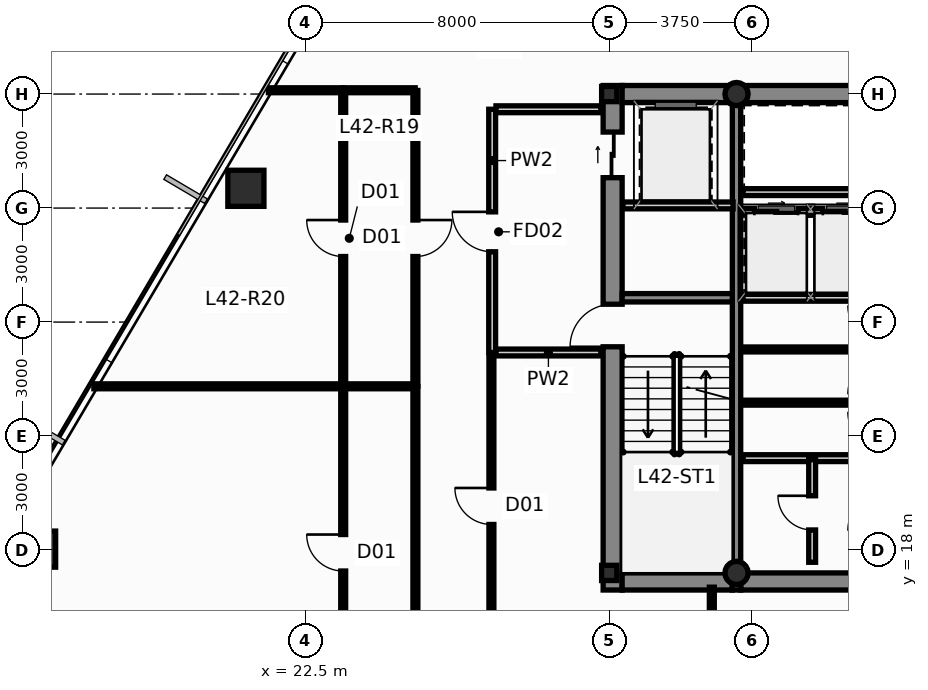
"""IFC4 building model, lengths in metres.
Left out: names, types, materials, properties, quantities, classifications, styles, units other than length and angle.
Written with IfcOpenShell. Run it as: python <this file> out.ifc"""

import sys

from ifc_helpers import new_model, si_unit, direction, frame, frame_2d, origin, origin_2d, place, context, subcontext, project, spatial, rectangle, hollow_rectangle, hollow_circle, i_section, extrude, source, transform, mapped, element, fill, save


model = new_model("IFC4")
c1 = context("Model", 3, precision=1e-05, world=origin(), true_north=direction((0.0, 1.0)))
c2 = subcontext(c1, "Body", "Model", "MODEL_VIEW")
j1 = project(units=[si_unit("LENGTHUNIT", "METRE"), si_unit("PLANEANGLEUNIT", "RADIAN")], contexts=[c1])
p1 = place(None, origin())
s1 = spatial("IfcSite", under=j1, at=p1, CompositionType="ELEMENT")
p2 = place(p1, origin())
s2 = spatial("IfcBuilding", under=s1, at=p2, CompositionType="ELEMENT")
p3 = place(p2, frame((0.0, 0.0, 162.15)))
s3 = spatial("IfcBuildingStorey", under=s2, at=p3, CompositionType="ELEMENT", Elevation=162.15)
m1 = source(origin(), c2, "Body", "SweptSolid", [
    extrude(i_section(OverallWidth=0.4, OverallDepth=0.4, WebThickness=0.02, FlangeThickness=0.032, at=origin_2d()), origin(), (0.0, 0.0, 1.0), 3.65),
])
for number, where, z_axis, x_axis in (
    (1, (30.5, 17.4, 0.0), (0.0, 0.0, 1.0), (1.0, 0.0, 0.0)),
    (2, (30.5, 30.0, 0.0), (0.0, 0.0, 1.0), (1.0, 0.0, 0.0)),
):
    element("IfcColumn", number, at=place(p3, frame(where, z_axis=z_axis, x_axis=x_axis)), inside=s3, PredefinedType="COLUMN", context=c2, shape_type="MappedRepresentation", body=[
        mapped(m1, transform((0.0, 0.0, 0.0), scale=1.0)),
    ])
m2 = source(origin(), c2, "Body", "SweptSolid", [
    extrude(hollow_circle(Radius=0.305, WallThickness=0.025, at=origin_2d()), origin(), (0.0, 0.0, 1.0), 3.65),
])
for number, where, z_axis, x_axis in (
    (3, (33.85, 17.4, 0.0), (0.0, 0.0, 1.0), (1.0, 0.0, 0.0)),
    (4, (33.85, 30.0, 0.0), (0.0, 0.0, 1.0), (1.0, 0.0, 0.0)),
):
    element("IfcColumn", number, at=place(p3, frame(where, z_axis=z_axis, x_axis=x_axis)), inside=s3, PredefinedType="COLUMN", context=c2, shape_type="MappedRepresentation", body=[
        mapped(m2, transform((0.0, 0.0, 0.0), scale=1.0)),
    ])
p4 = place(p3, frame((30.59, 16.95, 0.0), z_axis=(0.0, 0.0, 1.0), x_axis=(0.0, 1.0, 0.0)))
e5 = element("IfcWall", 5, at=p4, inside=s3, PredefinedType="SHEAR", context=c2, shape_type="SweptSolid", body=[
    extrude(rectangle(XDim=13.275, YDim=0.5, at=frame_2d((6.638, 0.0))), origin(), (0.0, 0.0, 1.0), 3.65),
])
p5 = place(p4, frame((6.4, 0.0, 0.0)))
e6 = element("IfcOpeningElement", 6, at=p5, cuts=e5, PredefinedType="OPENING", context=c2, shape_type="SweptSolid", body=[
    extrude(rectangle(XDim=1.12, YDim=2.15, at=frame_2d((0.56, 1.075))), frame((0.0, 0.262, 0.0), z_axis=(0.0, -1.0, 0.0), x_axis=(1.0, 0.0, 0.0)), (0.0, 0.0, 1.0), 0.524),
])
p6 = place(p4, frame((10.85, 0.0, 0.0)))
e7 = element("IfcOpeningElement", 7, at=p6, cuts=e5, PredefinedType="OPENING", context=c2, shape_type="SweptSolid", body=[
    extrude(rectangle(XDim=1.2, YDim=2.2, at=frame_2d((0.6, 1.1))), frame((0.0, 0.262, 0.0), z_axis=(0.0, -1.0, 0.0), x_axis=(1.0, 0.0, 0.0)), (0.0, 0.0, 1.0), 0.524),
])
p7 = place(p3, frame((30.84, 17.175, 0.0), z_axis=(0.0, 0.0, 1.0), x_axis=(1.0, 0.0, 0.0)))
e8 = element("IfcWall", 8, at=p7, inside=s3, PredefinedType="SHEAR", context=c2, shape_type="SweptSolid", body=[
    extrude(rectangle(XDim=2.9, YDim=0.45, at=frame_2d((1.45, 0.0))), origin(), (0.0, 0.0, 1.0), 3.65),
])
p8 = place(p3, frame((33.96, 17.175, 0.0), z_axis=(0.0, 0.0, 1.0), x_axis=(1.0, 0.0, 0.0)))
e9 = element("IfcWall", 9, at=p8, inside=s3, PredefinedType="SHEAR", context=c2, shape_type="SweptSolid", body=[
    extrude(rectangle(XDim=8.08, YDim=0.45, at=frame_2d((4.04, 0.0))), origin(), (0.0, 0.0, 1.0), 3.65),
])
p9 = place(p3, frame((30.84, 30.0, 0.0), z_axis=(0.0, 0.0, 1.0), x_axis=(1.0, 0.0, 0.0)))
e10 = element("IfcWall", 10, at=p9, inside=s3, PredefinedType="SHEAR", context=c2, shape_type="SweptSolid", body=[
    extrude(rectangle(XDim=2.9, YDim=0.45, at=frame_2d((1.45, 0.0))), origin(), (0.0, 0.0, 1.0), 3.65),
])
p10 = place(p3, frame((33.96, 30.0, 0.0), z_axis=(0.0, 0.0, 1.0), x_axis=(1.0, 0.0, 0.0)))
e11 = element("IfcWall", 11, at=p10, inside=s3, PredefinedType="SHEAR", context=c2, shape_type="SweptSolid", body=[
    extrude(rectangle(XDim=3.78, YDim=0.45, at=frame_2d((1.89, 0.0))), origin(), (0.0, 0.0, 1.0), 3.65),
])
p11 = place(p3, frame((33.85, 16.95, 0.0), z_axis=(0.0, 0.0, 1.0), x_axis=(0.0, 1.0, 0.0)))
e12 = element("IfcWall", 12, at=p11, inside=s3, PredefinedType="SHEAR", context=c2, shape_type="SweptSolid", body=[
    extrude(rectangle(XDim=13.275, YDim=0.22, at=frame_2d((6.638, 0.0))), origin(), (0.0, 0.0, 1.0), 3.65),
])
p12 = place(p3, frame((30.84, 24.64, 0.0), z_axis=(0.0, 0.0, 1.0), x_axis=(1.0, 0.0, 0.0)))
e13 = element("IfcWall", 13, at=p12, inside=s3, PredefinedType="SHEAR", context=c2, shape_type="SweptSolid", body=[
    extrude(rectangle(XDim=2.9, YDim=0.22, at=frame_2d((1.45, 0.0))), origin(), (0.0, 0.0, 1.0), 3.65),
])
m3 = source(origin(), c2, "Body", "SweptSolid", [
    extrude(hollow_rectangle(XDim=0.95, YDim=0.95, WallThickness=0.05, at=origin_2d()), origin(), (0.0, 0.0, 1.0), 3.651),
])
p13 = place(p3, frame((20.94, 27.52, 0.0), z_axis=(0.014845459728, -0.013775516685, 0.9997949027), x_axis=(0.68019775991, 0.733028653883, 0.0)))
e14 = element("IfcColumn", 14, at=p13, inside=s3, PredefinedType="COLUMN", context=c2, shape_type="MappedRepresentation", body=[
    mapped(m3, transform((0.0, 0.0, 0.0), scale=1.0)),
])
m4 = source(origin(), c2, "Body", "SweptSolid", [
    extrude(hollow_rectangle(XDim=0.95, YDim=0.95, WallThickness=0.05, at=origin_2d()), origin(), (0.0, 0.0, 1.0), 3.651),
])
p14 = place(p3, frame((15.458, 18.026, 0.0), z_axis=(0.010431098089, -0.021530856313, 0.999713766245), x_axis=(0.899947055326, 0.435999194506, 0.0)))
e15 = element("IfcColumn", 15, at=p14, inside=s3, PredefinedType="COLUMN", context=c2, shape_type="MappedRepresentation", body=[
    mapped(m4, transform((0.0, 0.0, 0.0), scale=1.0)),
])
p15 = place(p3, frame((34.02, 26.9, 0.0), z_axis=(0.0, 0.0, 1.0), x_axis=(1.0, 0.0, 0.0)))
e16 = element("IfcWall", 16, at=p15, inside=s3, PredefinedType="PARTITIONING", context=c2, shape_type="SweptSolid", body=[
    extrude(rectangle(XDim=3.6, YDim=0.18, at=frame_2d((1.8, 0.0))), origin(), (0.0, 0.0, 1.0), 3.4),
])
p16 = place(p15, frame((0.3, 0.0, 0.0)))
e17 = element("IfcOpeningElement", 17, at=p16, cuts=e16, PredefinedType="OPENING", context=c2, shape_type="SweptSolid", body=[
    extrude(rectangle(XDim=1.15, YDim=2.2, at=frame_2d((0.575, 1.1))), frame((0.0, 0.102, 0.0), z_axis=(0.0, -1.0, 0.0), x_axis=(1.0, 0.0, 0.0)), (0.0, 0.0, 1.0), 0.204),
])
p17 = place(p15, frame((2.1, 0.0, 0.0)))
e18 = element("IfcOpeningElement", 18, at=p17, cuts=e16, PredefinedType="OPENING", context=c2, shape_type="SweptSolid", body=[
    extrude(rectangle(XDim=1.15, YDim=2.2, at=frame_2d((0.575, 1.1))), frame((0.0, 0.102, 0.0), z_axis=(0.0, -1.0, 0.0), x_axis=(1.0, 0.0, 0.0)), (0.0, 0.0, 1.0), 0.204),
])
p18 = place(p3, frame((34.02, 24.64, 0.0), z_axis=(0.0, 0.0, 1.0), x_axis=(1.0, 0.0, 0.0)))
e19 = element("IfcWall", 19, at=p18, inside=s3, PredefinedType="PARTITIONING", context=c2, shape_type="SweptSolid", body=[
    extrude(rectangle(XDim=3.68, YDim=0.18, at=frame_2d((1.84, 0.0))), origin(), (0.0, 0.0, 1.0), 3.4),
])
p19 = place(p3, frame((34.02, 27.42, 0.0), z_axis=(0.0, 0.0, 1.0), x_axis=(1.0, 0.0, 0.0)))
e20 = element("IfcWall", 20, at=p19, inside=s3, PredefinedType="PARTITIONING", context=c2, shape_type="SweptSolid", body=[
    extrude(rectangle(XDim=3.66, YDim=0.18, at=frame_2d((1.83, 0.0))), origin(), (0.0, 0.0, 1.0), 3.4),
])
p20 = place(p3, frame((27.42, 23.2, 0.0), z_axis=(0.0, 0.0, 1.0), x_axis=(0.0, 1.0, 0.0)))
e21 = element("IfcWall", 21, at=p20, inside=s3, PredefinedType="PARTITIONING", context=c2, shape_type="SweptSolid", body=[
    extrude(rectangle(XDim=6.4, YDim=0.18, at=frame_2d((3.2, 0.0))), origin(), (0.0, 0.0, 1.0), 3.078),
])
p21 = place(p20, frame((2.65, 0.0, 0.0)))
e22 = element("IfcOpeningElement", 22, at=p21, cuts=e21, PredefinedType="OPENING", context=c2, shape_type="SweptSolid", body=[
    extrude(rectangle(XDim=1.05, YDim=2.15, at=frame_2d((0.525, 1.075))), frame((0.0, 0.102, 0.0), z_axis=(0.0, -1.0, 0.0), x_axis=(1.0, 0.0, 0.0)), (0.0, 0.0, 1.0), 0.204),
])
p22 = place(p3, frame((27.52, 23.2, 0.0), z_axis=(0.0, 0.0, 1.0), x_axis=(1.0, 0.0, 0.0)))
e23 = element("IfcWall", 23, at=p22, inside=s3, PredefinedType="PARTITIONING", context=c2, shape_type="SweptSolid", body=[
    extrude(rectangle(XDim=2.76, YDim=0.18, at=frame_2d((1.38, 0.0))), origin(), (0.0, 0.0, 1.0), 3.4),
])
p23 = place(p3, frame((27.52, 29.6, 0.0), z_axis=(0.0, 0.0, 1.0), x_axis=(1.0, 0.0, 0.0)))
e24 = element("IfcWall", 24, at=p23, inside=s3, PredefinedType="PARTITIONING", context=c2, shape_type="SweptSolid", body=[
    extrude(rectangle(XDim=2.76, YDim=0.18, at=frame_2d((1.38, 0.0))), origin(), (0.0, 0.0, 1.0), 2.925),
])
p24 = place(p3, frame((30.86, 27.07, 0.0), z_axis=(0.0, 0.0, 1.0), x_axis=(1.0, 0.0, 0.0)))
e25 = element("IfcWall", 25, at=p24, inside=s3, PredefinedType="PARTITIONING", context=c2, shape_type="SweptSolid", body=[
    extrude(rectangle(XDim=2.9, YDim=0.18, at=frame_2d((1.45, 0.0))), origin(), (0.0, 0.0, 1.0), 3.4),
])
p25 = place(p3, frame((34.02, 20.42, 0.0), z_axis=(0.0, 0.0, 1.0), x_axis=(1.0, 0.0, 0.0)))
e26 = element("IfcWall", 26, at=p25, inside=s3, PredefinedType="PARTITIONING", context=c2, shape_type="SweptSolid", body=[
    extrude(rectangle(XDim=3.64, YDim=0.18, at=frame_2d((1.82, 0.0))), origin(), (0.0, 0.0, 1.0), 3.4),
])
for number, where, z_axis, x_axis in (
    (27, (34.02, 21.88, 0.0), (0.0, 0.0, 1.0), (1.0, 0.0, 0.0)),
    (28, (34.02, 23.28, 0.0), (0.0, 0.0, 1.0), (1.0, 0.0, 0.0)),
):
    element("IfcWall", number, at=place(p3, frame(where, z_axis=z_axis, x_axis=x_axis)), inside=s3, PredefinedType="PARTITIONING", context=c2, shape_type="SweptSolid", body=[
        extrude(rectangle(XDim=3.58, YDim=0.13, at=frame_2d((1.79, 0.0))), origin(), (0.0, 0.0, 1.0), 3.4),
    ])
p26 = place(p3, frame((35.84, 17.68, 0.0), z_axis=(0.0, 0.0, 1.0), x_axis=(0.0, 1.0, 0.0)))
e29 = element("IfcWall", 29, at=p26, inside=s3, PredefinedType="PARTITIONING", context=c2, shape_type="SweptSolid", body=[
    extrude(rectangle(XDim=2.7, YDim=0.18, at=frame_2d((1.35, 0.0))), origin(), (0.0, 0.0, 1.0), 3.4),
])
p27 = place(p26, frame((0.85, 0.0, 0.0)))
e30 = element("IfcOpeningElement", 30, at=p27, cuts=e29, PredefinedType="OPENING", context=c2, shape_type="SweptSolid", body=[
    extrude(rectangle(XDim=0.9, YDim=2.1, at=frame_2d((0.45, 1.05))), frame((0.0, 0.102, 0.0), z_axis=(0.0, -1.0, 0.0), x_axis=(1.0, 0.0, 0.0)), (0.0, 0.0, 1.0), 0.204),
])
p28 = place(p3, frame((23.5, 13.555, 0.0), z_axis=(0.0, 0.0, 1.0), x_axis=(0.0, 1.0, 0.0)))
e31 = element("IfcWall", 31, at=p28, inside=s3, PredefinedType="PARTITIONING", context=c2, shape_type="SweptSolid", body=[
    extrude(rectangle(XDim=8.75, YDim=0.13, at=frame_2d((4.375, 0.0))), origin(), (0.0, 0.0, 1.0), 3.078),
])
p29 = place(p28, frame((3.895, 0.0, 0.0)))
e32 = element("IfcOpeningElement", 32, at=p29, cuts=e31, PredefinedType="OPENING", context=c2, shape_type="SweptSolid", body=[
    extrude(rectangle(XDim=0.96, YDim=2.15, at=frame_2d((0.48, 1.075))), frame((0.0, 0.077, 0.0), z_axis=(0.0, -1.0, 0.0), x_axis=(1.0, 0.0, 0.0)), (0.0, 0.0, 1.0), 0.154),
])
p30 = place(p3, frame((27.4, 15.205, 0.0), z_axis=(0.0, 0.0, 1.0), x_axis=(0.0, 1.0, 0.0)))
e33 = element("IfcWall", 33, at=p30, inside=s3, PredefinedType="PARTITIONING", context=c2, shape_type="SweptSolid", body=[
    extrude(rectangle(XDim=7.9, YDim=0.13, at=frame_2d((3.95, 0.0))), origin(), (0.0, 0.0, 1.0), 3.4),
])
p31 = place(p30, frame((3.47, 0.0, 0.0)))
e34 = element("IfcOpeningElement", 34, at=p31, cuts=e33, PredefinedType="OPENING", context=c2, shape_type="SweptSolid", body=[
    extrude(rectangle(XDim=0.96, YDim=2.15, at=frame_2d((0.48, 1.075))), frame((0.0, 0.077, 0.0), z_axis=(0.0, -1.0, 0.0), x_axis=(1.0, 0.0, 0.0)), (0.0, 0.0, 1.0), 0.154),
])
p32 = place(p3, frame((25.4, 30.095, 0.0), z_axis=(0.0, 0.0, 1.0), x_axis=(0.0, -1.0, 0.0)))
e35 = element("IfcWall", 35, at=p32, inside=s3, PredefinedType="PARTITIONING", context=c2, shape_type="SweptSolid", body=[
    extrude(rectangle(XDim=7.78, YDim=0.13, at=frame_2d((3.89, 0.0))), origin(), (0.0, 0.0, 1.0), 3.078),
])
p33 = place(p32, frame((3.41, 0.0, 0.0)))
e36 = element("IfcOpeningElement", 36, at=p33, cuts=e35, PredefinedType="OPENING", context=c2, shape_type="SweptSolid", body=[
    extrude(rectangle(XDim=0.96, YDim=2.15, at=frame_2d((0.48, 1.075))), frame((0.0, 0.077, 0.0), z_axis=(0.0, -1.0, 0.0), x_axis=(1.0, 0.0, 0.0)), (0.0, 0.0, 1.0), 0.154),
])
p34 = place(p3, frame((23.5, 22.315, 0.0), z_axis=(0.0, 0.0, 1.0), x_axis=(0.0, 1.0, 0.0)))
e37 = element("IfcWall", 37, at=p34, inside=s3, PredefinedType="PARTITIONING", context=c2, shape_type="SweptSolid", body=[
    extrude(rectangle(XDim=7.78, YDim=0.13, at=frame_2d((3.89, 0.0))), origin(), (0.0, 0.0, 1.0), 3.078),
])
p35 = place(p34, frame((3.41, 0.0, 0.0)))
e38 = element("IfcOpeningElement", 38, at=p35, cuts=e37, PredefinedType="OPENING", context=c2, shape_type="SweptSolid", body=[
    extrude(rectangle(XDim=0.96, YDim=2.15, at=frame_2d((0.48, 1.075))), frame((0.0, 0.077, 0.0), z_axis=(0.0, -1.0, 0.0), x_axis=(1.0, 0.0, 0.0)), (0.0, 0.0, 1.0), 0.154),
])
p36 = place(p3, frame((25.4, 22.305, 0.0), z_axis=(0.0, 0.0, 1.0), x_axis=(0.0, -1.0, 0.0)))
e39 = element("IfcWall", 39, at=p36, inside=s3, PredefinedType="PARTITIONING", context=c2, shape_type="SweptSolid", body=[
    extrude(rectangle(XDim=7.1, YDim=0.13, at=frame_2d((3.55, 0.0))), origin(), (0.0, 0.0, 1.0), 3.078),
])
p37 = place(p3, frame((16.939, 22.31, 0.0), z_axis=(0.0, 0.0, 1.0), x_axis=(1.0, 0.0, 0.0)))
e40 = element("IfcWall", 40, at=p37, inside=s3, PredefinedType="PARTITIONING", context=c2, shape_type="SweptSolid", body=[
    extrude(rectangle(XDim=6.556, YDim=0.13, at=frame_2d((3.278, 0.0))), origin(), (0.0, 0.0, 1.0), 3.4),
])
p38 = place(p3, frame((33.2, 13.555, 0.0), z_axis=(0.0, 0.0, 1.0), x_axis=(0.0, 1.0, 0.0)))
e41 = element("IfcWall", 41, at=p38, inside=s3, PredefinedType="PARTITIONING", context=c2, shape_type="SweptSolid", body=[
    extrude(rectangle(XDim=3.47, YDim=0.13, at=frame_2d((1.735, 0.0))), origin(), (0.0, 0.0, 1.0), 3.4),
])
p39 = place(p3, frame((21.533, 30.1, 0.0), z_axis=(0.0, 0.0, 1.0), x_axis=(1.0, 0.0, 0.0)))
e42 = element("IfcWall", 42, at=p39, inside=s3, PredefinedType="PARTITIONING", context=c2, shape_type="SweptSolid", body=[
    extrude(rectangle(XDim=1.962, YDim=0.13, at=frame_2d((0.981, 0.0))), origin(), (0.0, 0.0, 1.0), 3.4),
])
for number, where, z_axis, x_axis in (
    (43, (23.505, 30.1, 0.0), (0.0, 0.0, 1.0), (1.0, 0.0, 0.0)),
    (44, (23.505, 22.31, 0.0), (0.0, 0.0, 1.0), (1.0, 0.0, 0.0)),
):
    element("IfcWall", number, at=place(p3, frame(where, z_axis=z_axis, x_axis=x_axis)), inside=s3, PredefinedType="PARTITIONING", context=c2, shape_type="SweptSolid", body=[
        extrude(rectangle(XDim=1.89, YDim=0.13, at=frame_2d((0.945, 0.0))), origin(), (0.0, 0.0, 1.0), 3.4),
    ])
p40 = place(p5, origin())
e45 = element("IfcDoor", 45, at=p40, inside=s3, OperationType="SINGLE_SWING_LEFT", PredefinedType="DOOR", context=c2, shape_type="SweptSolid", body=[
    extrude(rectangle(XDim=1.12, YDim=2.15, at=frame_2d((0.56, 1.075))), frame((0.0, 0.025, 0.0), z_axis=(0.0, -1.0, 0.0), x_axis=(1.0, 0.0, 0.0)), (0.0, 0.0, 1.0), 0.05),
])
fill(e6, e45)
p41 = place(p6, origin())
e46 = element("IfcDoor", 46, at=p41, inside=s3, OperationType="SLIDING_TO_LEFT", PredefinedType="DOOR", context=c2, shape_type="SweptSolid", body=[
    extrude(rectangle(XDim=1.2, YDim=2.2, at=frame_2d((0.6, 1.1))), frame((0.0, 0.025, 0.0), z_axis=(0.0, -1.0, 0.0), x_axis=(1.0, 0.0, 0.0)), (0.0, 0.0, 1.0), 0.05),
])
fill(e7, e46)
p42 = place(p16, origin())
e47 = element("IfcDoor", 47, at=p42, inside=s3, OperationType="SLIDING_TO_LEFT", PredefinedType="DOOR", context=c2, shape_type="SweptSolid", body=[
    extrude(rectangle(XDim=1.15, YDim=2.2, at=frame_2d((0.575, 1.1))), frame((0.0, 0.025, 0.0), z_axis=(0.0, -1.0, 0.0), x_axis=(1.0, 0.0, 0.0)), (0.0, 0.0, 1.0), 0.05),
])
fill(e17, e47)
p43 = place(p17, origin())
e48 = element("IfcDoor", 48, at=p43, inside=s3, OperationType="SLIDING_TO_RIGHT", PredefinedType="DOOR", context=c2, shape_type="SweptSolid", body=[
    extrude(rectangle(XDim=1.15, YDim=2.2, at=frame_2d((0.575, 1.1))), frame((0.0, 0.025, 0.0), z_axis=(0.0, -1.0, 0.0), x_axis=(1.0, 0.0, 0.0)), (0.0, 0.0, 1.0), 0.05),
])
fill(e18, e48)
p44 = place(p21, origin())
e49 = element("IfcDoor", 49, at=p44, inside=s3, OperationType="SINGLE_SWING_RIGHT", PredefinedType="DOOR", context=c2, shape_type="SweptSolid", body=[
    extrude(rectangle(XDim=1.05, YDim=2.15, at=frame_2d((0.525, 1.075))), frame((0.0, 0.025, 0.0), z_axis=(0.0, -1.0, 0.0), x_axis=(1.0, 0.0, 0.0)), (0.0, 0.0, 1.0), 0.05),
])
fill(e22, e49)
p45 = place(p27, origin())
e50 = element("IfcDoor", 50, at=p45, inside=s3, OperationType="SINGLE_SWING_RIGHT", PredefinedType="DOOR", context=c2, shape_type="SweptSolid", body=[
    extrude(rectangle(XDim=0.9, YDim=2.1, at=frame_2d((0.45, 1.05))), frame((0.0, 0.025, 0.0), z_axis=(0.0, -1.0, 0.0), x_axis=(1.0, 0.0, 0.0)), (0.0, 0.0, 1.0), 0.05),
])
fill(e30, e50)
p46 = place(p29, origin())
e51 = element("IfcDoor", 51, at=p46, inside=s3, OperationType="SINGLE_SWING_RIGHT", PredefinedType="DOOR", context=c2, shape_type="SweptSolid", body=[
    extrude(rectangle(XDim=0.96, YDim=2.15, at=frame_2d((0.48, 1.075))), frame((0.0, 0.025, 0.0), z_axis=(0.0, -1.0, 0.0), x_axis=(1.0, 0.0, 0.0)), (0.0, 0.0, 1.0), 0.05),
])
fill(e32, e51)
p47 = place(p31, origin())
e52 = element("IfcDoor", 52, at=p47, inside=s3, OperationType="SINGLE_SWING_RIGHT", PredefinedType="DOOR", context=c2, shape_type="SweptSolid", body=[
    extrude(rectangle(XDim=0.96, YDim=2.15, at=frame_2d((0.48, 1.075))), frame((0.0, 0.025, 0.0), z_axis=(0.0, -1.0, 0.0), x_axis=(1.0, 0.0, 0.0)), (0.0, 0.0, 1.0), 0.05),
])
fill(e34, e52)
p48 = place(p33, origin())
e53 = element("IfcDoor", 53, at=p48, inside=s3, OperationType="SINGLE_SWING_LEFT", PredefinedType="DOOR", context=c2, shape_type="SweptSolid", body=[
    extrude(rectangle(XDim=0.96, YDim=2.15, at=frame_2d((0.48, 1.075))), frame((0.0, 0.025, 0.0), z_axis=(0.0, -1.0, 0.0), x_axis=(1.0, 0.0, 0.0)), (0.0, 0.0, 1.0), 0.05),
])
fill(e36, e53)
p49 = place(p35, origin())
e54 = element("IfcDoor", 54, at=p49, inside=s3, OperationType="SINGLE_SWING_RIGHT", PredefinedType="DOOR", context=c2, shape_type="SweptSolid", body=[
    extrude(rectangle(XDim=0.96, YDim=2.15, at=frame_2d((0.48, 1.075))), frame((0.0, 0.025, 0.0), z_axis=(0.0, -1.0, 0.0), x_axis=(1.0, 0.0, 0.0)), (0.0, 0.0, 1.0), 0.05),
])
fill(e38, e54)
save(model, sys.argv[1])
